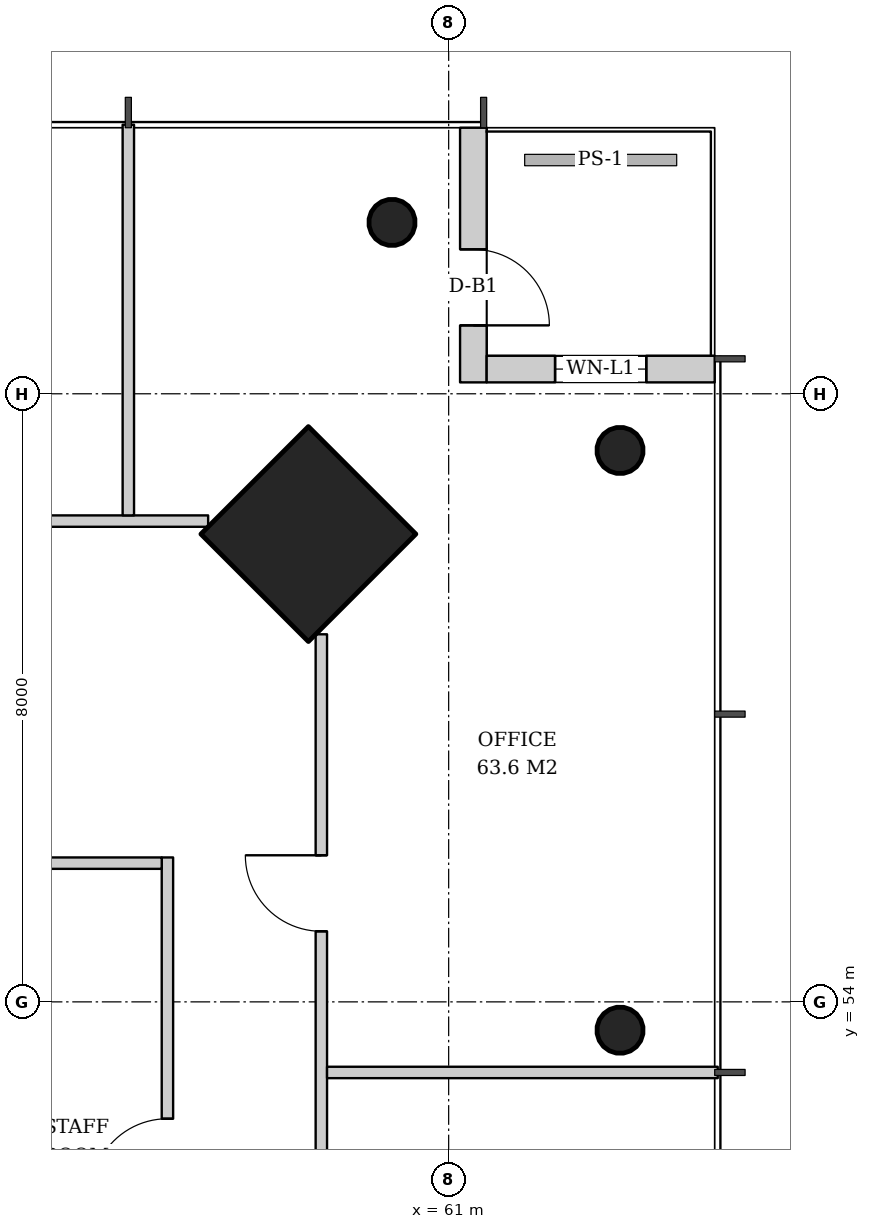
"""IFC4 building model, lengths in metres.
Left out: names, types, materials, properties, quantities, classifications, styles, units other than length and angle.
Written with IfcOpenShell. Run it as: python <this file> out.ifc"""

import sys

from ifc_helpers import new_model, si_unit, direction, frame, frame_2d, origin, origin_2d, place, context, subcontext, project, spatial, rectangle, hollow_circle, extrude, element, fill, save


model = new_model("IFC4")
c1 = context("Model", 3, precision=1e-05, world=origin(), true_north=direction((0.0, 1.0)))
c2 = subcontext(c1, "Body", "Model", "MODEL_VIEW")
j1 = project(units=[si_unit("LENGTHUNIT", "METRE"), si_unit("PLANEANGLEUNIT", "RADIAN")], contexts=[c1])
p1 = place(None, origin())
s1 = spatial("IfcSite", under=j1, at=p1, CompositionType="ELEMENT")
p2 = place(p1, origin())
s2 = spatial("IfcBuilding", under=s1, at=p2, CompositionType="ELEMENT")
p3 = place(p2, frame((0.0, 0.0, 199.6)))
s3 = spatial("IfcBuildingStorey", under=s2, at=p3, CompositionType="ELEMENT", Elevation=199.6)
p4 = place(p3, frame((59.193, 60.193, 0.0), z_axis=(-0.031900153262, -0.031900153262, 0.998981861919), x_axis=(0.707106781187, -0.707106781187, 0.0)))
e1 = element("IfcColumn", 1, at=p4, inside=s3, PredefinedType="COLUMN", context=c2, shape_type="SweptSolid", body=[
    extrude(rectangle(XDim=2.0, YDim=2.0, at=origin_2d()), origin(), (0.0, 0.0, 1.0), 3.804),
])
p5 = place(p3, frame((63.293, 61.293, 0.0), z_axis=(-0.031964207655, -0.031964207655, 0.998977766949), x_axis=(0.707106781187, -0.707106781187, 0.0)))
e2 = element("IfcColumn", 2, at=p5, inside=s3, PredefinedType="COLUMN", context=c2, shape_type="SweptSolid", body=[
    extrude(hollow_circle(Radius=0.305, WallThickness=0.025, at=origin_2d()), origin(), (0.0, 0.0, 1.0), 3.804),
])
p6 = place(p3, frame((63.293, 53.646, 0.0), z_axis=(-0.031976461511, -0.015988230756, 0.999360736865), x_axis=(0.4472135955, -0.894427191, 0.0)))
e3 = element("IfcColumn", 3, at=p6, inside=s3, PredefinedType="COLUMN", context=c2, shape_type="SweptSolid", body=[
    extrude(hollow_circle(Radius=0.305, WallThickness=0.025, at=origin_2d()), origin(), (0.0, 0.0, 1.0), 3.802),
])
p7 = place(p3, frame((60.293, 64.293, 0.0), z_axis=(-0.031964207655, -0.031964207655, 0.998977766949), x_axis=(0.707106781187, -0.707106781187, 0.0)))
e4 = element("IfcColumn", 4, at=p7, inside=s3, PredefinedType="COLUMN", context=c2, shape_type="SweptSolid", body=[
    extrude(hollow_circle(Radius=0.305, WallThickness=0.025, at=origin_2d()), origin(), (0.0, 0.0, 1.0), 3.804),
])
p8 = place(p3, frame((61.325, 65.5, 0.0), z_axis=(0.0, 0.0, 1.0), x_axis=(0.0, -1.0, 0.0)))
e5 = element("IfcWall", 5, at=p8, inside=s3, PredefinedType="SOLIDWALL", context=c2, shape_type="SweptSolid", body=[
    extrude(rectangle(XDim=3.35, YDim=0.35, at=frame_2d((1.675, 0.0))), origin(), (0.0, 0.0, 1.0), 3.62),
])
p9 = place(p8, frame((1.6, 0.0, 0.0)))
e6 = element("IfcOpeningElement", 6, at=p9, cuts=e5, PredefinedType="OPENING", context=c2, shape_type="SweptSolid", body=[
    extrude(rectangle(XDim=1.0, YDim=2.4, at=frame_2d((0.5, 1.2))), frame((0.0, 0.185, 0.0), z_axis=(0.0, -1.0, 0.0), x_axis=(1.0, 0.0, 0.0)), (0.0, 0.0, 1.0), 0.37),
])
p10 = place(p3, frame((61.5, 62.325, 0.0), z_axis=(0.0, 0.0, 1.0), x_axis=(1.0, 0.0, 0.0)))
e7 = element("IfcWall", 7, at=p10, inside=s3, PredefinedType="SOLIDWALL", context=c2, shape_type="SweptSolid", body=[
    extrude(rectangle(XDim=3.0, YDim=0.35, at=frame_2d((1.5, 0.0))), origin(), (0.0, 0.0, 1.0), 3.62),
])
p11 = place(p10, frame((0.9, 0.0, 0.6)))
e8 = element("IfcOpeningElement", 8, at=p11, cuts=e7, PredefinedType="OPENING", context=c2, shape_type="SweptSolid", body=[
    extrude(rectangle(XDim=1.2, YDim=2.55, at=frame_2d((0.6, 1.275))), frame((0.0, 0.185, 0.0), z_axis=(0.0, -1.0, 0.0), x_axis=(1.0, 0.0, 0.0)), (0.0, 0.0, 1.0), 0.37),
])
p12 = place(p3, frame((57.3, 48.025, 0.0), z_axis=(0.0, 0.0, 1.0), x_axis=(0.0, 1.0, 0.0)))
e9 = element("IfcWall", 9, at=p12, inside=s3, PredefinedType="PARTITIONING", context=c2, shape_type="SweptSolid", body=[
    extrude(rectangle(XDim=7.875, YDim=0.15, at=frame_2d((3.938, 0.0))), origin(), (0.0, 0.0, 1.0), 2.867),
])
p13 = place(p12, frame((3.438, 0.0, 0.0)))
e10 = element("IfcOpeningElement", 10, at=p13, cuts=e9, PredefinedType="OPENING", context=c2, shape_type="SweptSolid", body=[
    extrude(rectangle(XDim=1.0, YDim=2.1, at=frame_2d((0.5, 1.05))), frame((0.0, 0.085, 0.0), z_axis=(0.0, -1.0, 0.0), x_axis=(1.0, 0.0, 0.0)), (0.0, 0.0, 1.0), 0.17),
])
p14 = place(p3, frame((54.9, 55.825, 0.0), z_axis=(0.0, 0.0, 1.0), x_axis=(1.0, 0.0, 0.0)))
e11 = element("IfcWall", 11, at=p14, inside=s3, PredefinedType="PARTITIONING", context=c2, shape_type="SweptSolid", body=[
    extrude(rectangle(XDim=2.325, YDim=0.15, at=frame_2d((1.163, 0.0))), origin(), (0.0, 0.0, 1.0), 3.62),
])
p15 = place(p3, frame((59.325, 33.164, 0.0), z_axis=(0.0, 0.0, 1.0), x_axis=(0.0, 1.0, 0.0)))
e12 = element("IfcWall", 12, at=p15, inside=s3, PredefinedType="PARTITIONING", context=c2, shape_type="SweptSolid", body=[
    extrude(rectangle(XDim=25.671, YDim=0.15, at=frame_2d((12.836, 0.0))), origin(), (0.0, 0.0, 1.0), 2.867),
])
p16 = place(p15, frame((2.907, 0.0, 0.0)))
e13 = element("IfcOpeningElement", 13, at=p16, cuts=e12, PredefinedType="OPENING", context=c2, shape_type="SweptSolid", body=[
    extrude(rectangle(XDim=1.0, YDim=2.1, at=frame_2d((0.5, 1.05))), frame((0.0, 0.085, 0.0), z_axis=(0.0, -1.0, 0.0), x_axis=(1.0, 0.0, 0.0)), (0.0, 0.0, 1.0), 0.17),
])
p17 = place(p15, frame((7.622, 0.0, 0.0)))
e14 = element("IfcOpeningElement", 14, at=p17, cuts=e12, PredefinedType="OPENING", context=c2, shape_type="SweptSolid", body=[
    extrude(rectangle(XDim=1.0, YDim=2.1, at=frame_2d((0.5, 1.05))), frame((0.0, 0.085, 0.0), z_axis=(0.0, -1.0, 0.0), x_axis=(1.0, 0.0, 0.0)), (0.0, 0.0, 1.0), 0.17),
])
p18 = place(p15, frame((12.336, 0.0, 0.0)))
e15 = element("IfcOpeningElement", 15, at=p18, cuts=e12, PredefinedType="OPENING", context=c2, shape_type="SweptSolid", body=[
    extrude(rectangle(XDim=1.0, YDim=2.1, at=frame_2d((0.5, 1.05))), frame((0.0, 0.085, 0.0), z_axis=(0.0, -1.0, 0.0), x_axis=(1.0, 0.0, 0.0)), (0.0, 0.0, 1.0), 0.17),
])
p19 = place(p15, frame((17.05, 0.0, 0.0)))
e16 = element("IfcOpeningElement", 16, at=p19, cuts=e12, PredefinedType="OPENING", context=c2, shape_type="SweptSolid", body=[
    extrude(rectangle(XDim=1.0, YDim=2.1, at=frame_2d((0.5, 1.05))), frame((0.0, 0.085, 0.0), z_axis=(0.0, -1.0, 0.0), x_axis=(1.0, 0.0, 0.0)), (0.0, 0.0, 1.0), 0.17),
])
p20 = place(p15, frame((21.764, 0.0, 0.0)))
e17 = element("IfcOpeningElement", 17, at=p20, cuts=e12, PredefinedType="OPENING", context=c2, shape_type="SweptSolid", body=[
    extrude(rectangle(XDim=1.0, YDim=2.1, at=frame_2d((0.5, 1.05))), frame((0.0, 0.085, 0.0), z_axis=(0.0, -1.0, 0.0), x_axis=(1.0, 0.0, 0.0)), (0.0, 0.0, 1.0), 0.17),
])
p21 = place(p3, frame((59.4, 53.072, 0.0), z_axis=(0.0, 0.0, 1.0), x_axis=(1.0, 0.0, 0.0)))
e18 = element("IfcWall", 18, at=p21, inside=s3, PredefinedType="PARTITIONING", context=c2, shape_type="SweptSolid", body=[
    extrude(rectangle(XDim=5.14, YDim=0.15, at=frame_2d((2.57, 0.0))), origin(), (0.0, 0.0, 1.0), 3.12),
])
p22 = place(p3, frame((57.836, 60.325, 0.0), z_axis=(0.0, 0.0, 1.0), x_axis=(-1.0, 0.0, 0.0)))
e19 = element("IfcWall", 19, at=p22, inside=s3, PredefinedType="PARTITIONING", context=c2, shape_type="SweptSolid", body=[
    extrude(rectangle(XDim=25.671, YDim=0.15, at=frame_2d((12.836, 0.0))), origin(), (0.0, 0.0, 1.0), 2.867),
])
p23 = place(p22, frame((2.907, 0.0, 0.0)))
e20 = element("IfcOpeningElement", 20, at=p23, cuts=e19, PredefinedType="OPENING", context=c2, shape_type="SweptSolid", body=[
    extrude(rectangle(XDim=1.0, YDim=2.1, at=frame_2d((0.5, 1.05))), frame((0.0, 0.085, 0.0), z_axis=(0.0, -1.0, 0.0), x_axis=(1.0, 0.0, 0.0)), (0.0, 0.0, 1.0), 0.17),
])
p24 = place(p22, frame((7.622, 0.0, 0.0)))
e21 = element("IfcOpeningElement", 21, at=p24, cuts=e19, PredefinedType="OPENING", context=c2, shape_type="SweptSolid", body=[
    extrude(rectangle(XDim=1.0, YDim=2.1, at=frame_2d((0.5, 1.05))), frame((0.0, 0.085, 0.0), z_axis=(0.0, -1.0, 0.0), x_axis=(1.0, 0.0, 0.0)), (0.0, 0.0, 1.0), 0.17),
])
p25 = place(p22, frame((12.336, 0.0, 0.0)))
e22 = element("IfcOpeningElement", 22, at=p25, cuts=e19, PredefinedType="OPENING", context=c2, shape_type="SweptSolid", body=[
    extrude(rectangle(XDim=1.0, YDim=2.1, at=frame_2d((0.5, 1.05))), frame((0.0, 0.085, 0.0), z_axis=(0.0, -1.0, 0.0), x_axis=(1.0, 0.0, 0.0)), (0.0, 0.0, 1.0), 0.17),
])
p26 = place(p22, frame((17.05, 0.0, 0.0)))
e23 = element("IfcOpeningElement", 23, at=p26, cuts=e19, PredefinedType="OPENING", context=c2, shape_type="SweptSolid", body=[
    extrude(rectangle(XDim=1.0, YDim=2.1, at=frame_2d((0.5, 1.05))), frame((0.0, 0.085, 0.0), z_axis=(0.0, -1.0, 0.0), x_axis=(1.0, 0.0, 0.0)), (0.0, 0.0, 1.0), 0.17),
])
p27 = place(p22, frame((21.764, 0.0, 0.0)))
e24 = element("IfcOpeningElement", 24, at=p27, cuts=e19, PredefinedType="OPENING", context=c2, shape_type="SweptSolid", body=[
    extrude(rectangle(XDim=1.0, YDim=2.1, at=frame_2d((0.5, 1.05))), frame((0.0, 0.085, 0.0), z_axis=(0.0, -1.0, 0.0), x_axis=(1.0, 0.0, 0.0)), (0.0, 0.0, 1.0), 0.17),
])
p28 = place(p3, frame((56.786, 60.4, 0.0), z_axis=(0.0, 0.0, 1.0), x_axis=(0.0, 1.0, 0.0)))
e25 = element("IfcWall", 25, at=p28, inside=s3, PredefinedType="PARTITIONING", context=c2, shape_type="SweptSolid", body=[
    extrude(rectangle(XDim=5.14, YDim=0.15, at=frame_2d((2.57, 0.0))), origin(), (0.0, 0.0, 1.0), 3.12),
])
p29 = place(p9, origin())
e26 = element("IfcDoor", 26, at=p29, inside=s3, OperationType="SINGLE_SWING_RIGHT", PredefinedType="DOOR", context=c2, shape_type="SweptSolid", body=[
    extrude(rectangle(XDim=1.0, YDim=2.4, at=frame_2d((0.5, 1.2))), frame((0.0, 0.025, 0.0), z_axis=(0.0, -1.0, 0.0), x_axis=(1.0, 0.0, 0.0)), (0.0, 0.0, 1.0), 0.05),
])
fill(e6, e26)
p30 = place(p11, origin())
e27 = element("IfcWindow", 27, at=p30, inside=s3, PartitioningType="SINGLE_PANEL", PredefinedType="WINDOW", context=c2, shape_type="SweptSolid", body=[
    extrude(rectangle(XDim=1.2, YDim=2.55, at=frame_2d((0.6, 1.275))), frame((0.0, 0.03, 0.0), z_axis=(0.0, -1.0, 0.0), x_axis=(1.0, 0.0, 0.0)), (0.0, 0.0, 1.0), 0.06),
])
fill(e8, e27)
p31 = place(p13, origin())
e28 = element("IfcDoor", 28, at=p31, inside=s3, OperationType="SINGLE_SWING_LEFT", PredefinedType="DOOR", context=c2, shape_type="SweptSolid", body=[
    extrude(rectangle(XDim=1.0, YDim=2.1, at=frame_2d((0.5, 1.05))), frame((0.0, 0.025, 0.0), z_axis=(0.0, -1.0, 0.0), x_axis=(1.0, 0.0, 0.0)), (0.0, 0.0, 1.0), 0.05),
])
fill(e10, e28)
p32 = place(p20, origin())
e29 = element("IfcDoor", 29, at=p32, inside=s3, OperationType="SINGLE_SWING_RIGHT", PredefinedType="DOOR", context=c2, shape_type="SweptSolid", body=[
    extrude(rectangle(XDim=1.0, YDim=2.1, at=frame_2d((0.5, 1.05))), frame((0.0, 0.025, 0.0), z_axis=(0.0, -1.0, 0.0), x_axis=(1.0, 0.0, 0.0)), (0.0, 0.0, 1.0), 0.05),
])
fill(e17, e29)
save(model, sys.argv[1])
